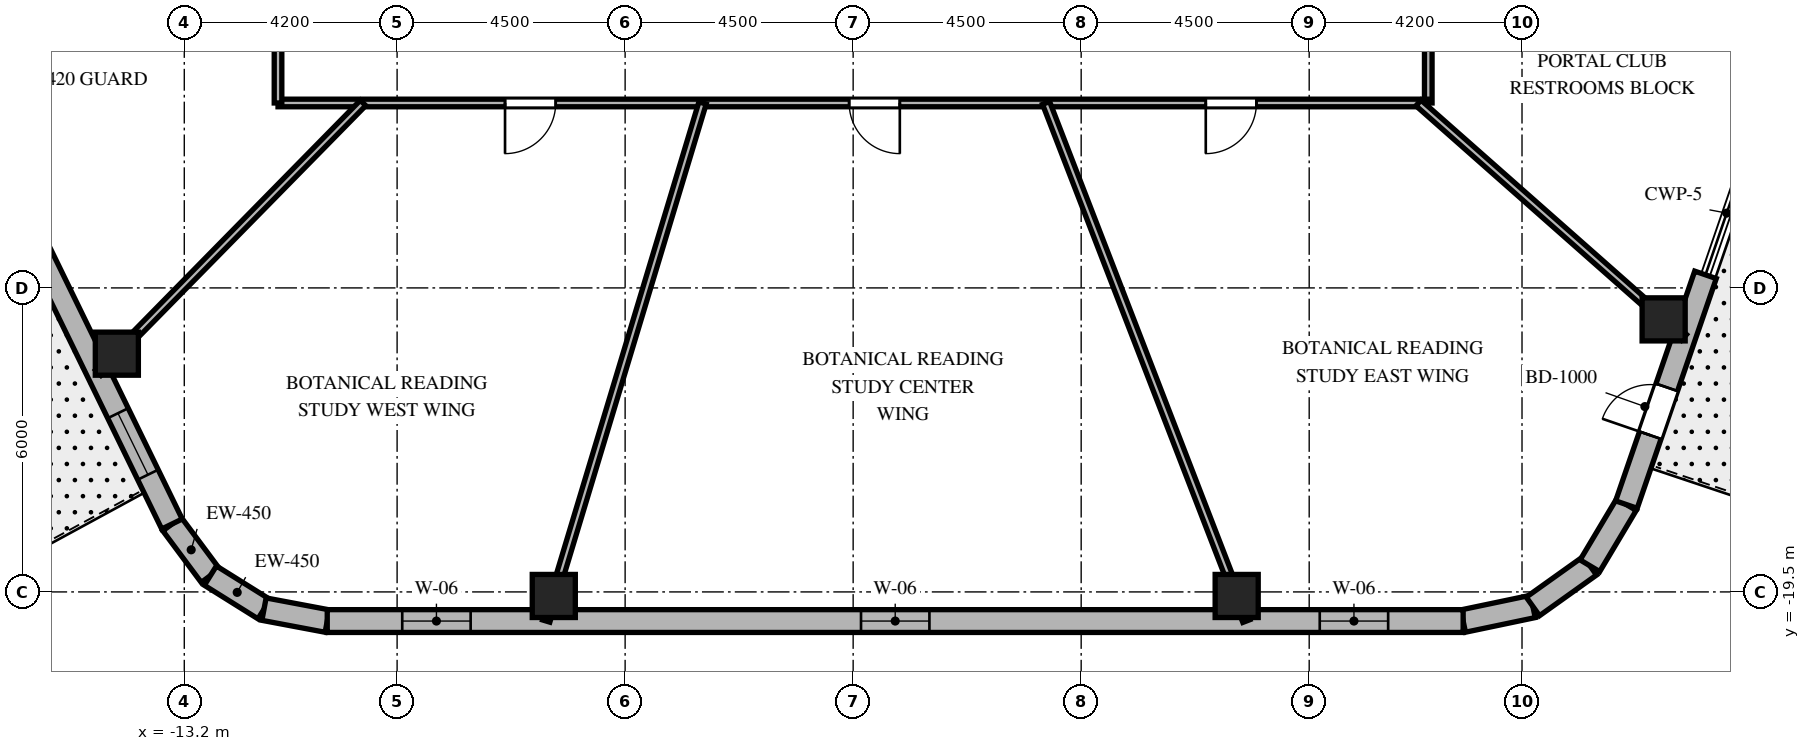
"""IFC4 building model, lengths in metres.
Left out: names, types, materials, properties, quantities, classifications, styles, units other than length and angle.
Written with IfcOpenShell. Run it as: python <this file> out.ifc"""

import sys

from ifc_helpers import new_model, si_unit, direction, frame, frame_2d, origin, origin_2d, place, context, subcontext, project, spatial, rectangle, extrude, element, fill, save


model = new_model("IFC4")
c1 = context("Model", 3, precision=1e-05, world=origin(), true_north=direction((0.0, 1.0)))
c2 = subcontext(c1, "Body", "Model", "MODEL_VIEW")
j1 = project(units=[si_unit("LENGTHUNIT", "METRE"), si_unit("PLANEANGLEUNIT", "RADIAN")], contexts=[c1])
p1 = place(None, origin())
s1 = spatial("IfcSite", under=j1, at=p1, CompositionType="ELEMENT")
p2 = place(p1, origin())
s2 = spatial("IfcBuilding", under=s1, at=p2, CompositionType="ELEMENT")
p3 = place(p2, frame((0.0, 0.0, 293.1)))
s3 = spatial("IfcBuildingStorey", under=s2, at=p3, CompositionType="ELEMENT", Elevation=293.1)
for number, where, z_axis, x_axis in (
    (1, (-5.908, -19.58, 0.0), (0.0, 0.0, 1.0), (1.0, 0.0, 0.0)),
    (2, (7.569, -19.58, 0.0), (0.0, 0.0, 1.0), (1.0, 0.0, 0.0)),
    (3, (15.995, -14.121, 0.0), (0.0, 0.0, 1.0), (1.0, 0.0, 0.0)),
    (4, (-14.531, -14.798, 0.0), (0.0, 0.0, 1.0), (1.0, 0.0, 0.0)),
):
    element("IfcColumn", number, at=place(p3, frame(where, z_axis=z_axis, x_axis=x_axis)), inside=s3, PredefinedType="COLUMN", context=c2, shape_type="SweptSolid", body=[
        extrude(rectangle(XDim=0.85, YDim=0.85, at=origin_2d()), origin(), (0.0, 0.0, 1.0), 4.5),
    ])
p4 = place(p3, frame((-13.443, -18.16, 0.0), z_axis=(0.0, 0.0, 1.0), x_axis=(0.597042425808, -0.802209661987, 0.0)))
e5 = element("IfcWall", 5, at=p4, inside=s3, PredefinedType="SOLIDWALL", context=c2, shape_type="SweptSolid", body=[
    extrude(rectangle(XDim=1.27, YDim=0.45, at=frame_2d((0.635, 0.0))), origin(), (0.0, 0.0, 1.0), 4.18),
])
p5 = place(p3, frame((-12.685, -19.178, 0.0), z_axis=(0.0, 0.0, 1.0), x_axis=(0.848031272749, -0.529946186362, 0.0)))
e6 = element("IfcWall", 6, at=p5, inside=s3, PredefinedType="SOLIDWALL", context=c2, shape_type="SweptSolid", body=[
    extrude(rectangle(XDim=1.248, YDim=0.45, at=frame_2d((0.624, 0.0))), origin(), (0.0, 0.0, 1.0), 4.18),
])
p6 = place(p3, frame((-11.626, -19.84, 0.0), z_axis=(0.0, 0.0, 1.0), x_axis=(0.982701956681, -0.185194126083, 0.0)))
e7 = element("IfcWall", 7, at=p6, inside=s3, PredefinedType="SOLIDWALL", context=c2, shape_type="SweptSolid", body=[
    extrude(rectangle(XDim=1.27, YDim=0.45, at=frame_2d((0.635, 0.0))), origin(), (0.0, 0.0, 1.0), 4.18),
])
p7 = place(p3, frame((12.038, -20.075, 0.0), z_axis=(0.0, 0.0, 1.0), x_axis=(0.978750122553, 0.205056571711, 0.0)))
e8 = element("IfcWall", 8, at=p7, inside=s3, PredefinedType="SOLIDWALL", context=c2, shape_type="SweptSolid", body=[
    extrude(rectangle(XDim=1.406, YDim=0.45, at=frame_2d((0.703, 0.0))), origin(), (0.0, 0.0, 1.0), 4.18),
])
p8 = place(p3, frame((13.415, -19.787, 0.0), z_axis=(0.0, 0.0, 1.0), x_axis=(0.814055493997, 0.580787097561, 0.0)))
e9 = element("IfcWall", 9, at=p8, inside=s3, PredefinedType="SOLIDWALL", context=c2, shape_type="SweptSolid", body=[
    extrude(rectangle(XDim=1.383, YDim=0.45, at=frame_2d((0.691, 0.0))), origin(), (0.0, 0.0, 1.0), 4.18),
])
p9 = place(p3, frame((14.54, -18.984, 0.0), z_axis=(0.0, 0.0, 1.0), x_axis=(0.512374906623, 0.858761873317, 0.0)))
e10 = element("IfcWall", 10, at=p9, inside=s3, PredefinedType="SOLIDWALL", context=c2, shape_type="SweptSolid", body=[
    extrude(rectangle(XDim=1.406, YDim=0.45, at=frame_2d((0.703, 0.0))), origin(), (0.0, 0.0, 1.0), 4.18),
])
p10 = place(p3, frame((-10.379, -20.075, 0.0), z_axis=(0.0, 0.0, 1.0), x_axis=(1.0, 0.0, 0.0)))
e11 = element("IfcWall", 11, at=p10, inside=s3, PredefinedType="SOLIDWALL", context=c2, shape_type="SweptSolid", body=[
    extrude(rectangle(XDim=22.417, YDim=0.45, at=frame_2d((11.208, 0.0))), origin(), (0.0, 0.0, 1.0), 4.18),
])
p11 = place(p10, frame((1.48, 0.0, 0.8)))
e12 = element("IfcOpeningElement", 12, at=p11, cuts=e11, PredefinedType="OPENING", context=c2, shape_type="SweptSolid", body=[
    extrude(rectangle(XDim=1.35, YDim=1.75, at=frame_2d((0.675, 0.875))), frame((0.0, 0.235, 0.0), z_axis=(0.0, -1.0, 0.0), x_axis=(1.0, 0.0, 0.0)), (0.0, 0.0, 1.0), 0.47),
])
p12 = place(p10, frame((10.534, 0.0, 0.8)))
e13 = element("IfcOpeningElement", 13, at=p12, cuts=e11, PredefinedType="OPENING", context=c2, shape_type="SweptSolid", body=[
    extrude(rectangle(XDim=1.35, YDim=1.75, at=frame_2d((0.675, 0.875))), frame((0.0, 0.235, 0.0), z_axis=(0.0, -1.0, 0.0), x_axis=(1.0, 0.0, 0.0)), (0.0, 0.0, 1.0), 0.47),
])
p13 = place(p10, frame((19.587, 0.0, 0.8)))
e14 = element("IfcOpeningElement", 14, at=p13, cuts=e11, PredefinedType="OPENING", context=c2, shape_type="SweptSolid", body=[
    extrude(rectangle(XDim=1.35, YDim=1.75, at=frame_2d((0.675, 0.875))), frame((0.0, 0.235, 0.0), z_axis=(0.0, -1.0, 0.0), x_axis=(1.0, 0.0, 0.0)), (0.0, 0.0, 1.0), 0.47),
])
p14 = place(p3, frame((15.26, -17.776, 0.0), z_axis=(0.0, 0.0, 1.0), x_axis=(0.325408461582, 0.945573547182, 0.0)))
e15 = element("IfcWall", 15, at=p14, inside=s3, PredefinedType="SOLIDWALL", context=c2, shape_type="SweptSolid", body=[
    extrude(rectangle(XDim=4.795, YDim=0.45, at=frame_2d((2.397, 0.0))), origin(), (0.0, 0.0, 1.0), 4.18),
])
p15 = place(p14, frame((1.447, 0.0, 0.0)))
e16 = element("IfcOpeningElement", 16, at=p15, cuts=e15, PredefinedType="OPENING", context=c2, shape_type="SweptSolid", body=[
    extrude(rectangle(XDim=1.0, YDim=2.15, at=frame_2d((0.5, 1.075))), frame((0.0, 0.235, 0.0), z_axis=(0.0, -1.0, 0.0), x_axis=(1.0, 0.0, 0.0)), (0.0, 0.0, 1.0), 0.47),
])
p16 = place(p3, frame((-21.138, -2.371, 0.0), z_axis=(0.0, 0.0, 1.0), x_axis=(0.438128124058, -0.89891253574, 0.0)))
e17 = element("IfcWall", 17, at=p16, inside=s3, PredefinedType="SOLIDWALL", context=c2, shape_type="SweptSolid", body=[
    extrude(rectangle(XDim=17.565, YDim=0.45, at=frame_2d((8.782, 0.0))), origin(), (0.0, 0.0, 1.0), 4.18),
])
p17 = place(p16, frame((4.769, 0.0, 0.0)))
e18 = element("IfcOpeningElement", 18, at=p17, cuts=e17, PredefinedType="OPENING", context=c2, shape_type="SweptSolid", body=[
    extrude(rectangle(XDim=0.95, YDim=2.15, at=frame_2d((0.475, 1.075))), frame((0.0, 0.235, 0.0), z_axis=(0.0, -1.0, 0.0), x_axis=(1.0, 0.0, 0.0)), (0.0, 0.0, 1.0), 0.47),
])
p18 = place(p16, frame((1.133, 0.0, 0.8)))
e19 = element("IfcOpeningElement", 19, at=p18, cuts=e17, PredefinedType="OPENING", context=c2, shape_type="SweptSolid", body=[
    extrude(rectangle(XDim=1.35, YDim=1.75, at=frame_2d((0.675, 0.875))), frame((0.0, 0.235, 0.0), z_axis=(0.0, -1.0, 0.0), x_axis=(1.0, 0.0, 0.0)), (0.0, 0.0, 1.0), 0.47),
])
p19 = place(p16, frame((8.158, 0.0, 0.8)))
e20 = element("IfcOpeningElement", 20, at=p19, cuts=e17, PredefinedType="OPENING", context=c2, shape_type="SweptSolid", body=[
    extrude(rectangle(XDim=1.35, YDim=1.75, at=frame_2d((0.675, 0.875))), frame((0.0, 0.235, 0.0), z_axis=(0.0, -1.0, 0.0), x_axis=(1.0, 0.0, 0.0)), (0.0, 0.0, 1.0), 0.47),
])
p20 = place(p16, frame((15.132, 0.0, 0.8)))
e21 = element("IfcOpeningElement", 21, at=p20, cuts=e17, PredefinedType="OPENING", context=c2, shape_type="SweptSolid", body=[
    extrude(rectangle(XDim=1.35, YDim=1.75, at=frame_2d((0.675, 0.875))), frame((0.0, 0.235, 0.0), z_axis=(0.0, -1.0, 0.0), x_axis=(1.0, 0.0, 0.0)), (0.0, 0.0, 1.0), 0.47),
])
p21 = place(p3, frame((11.35, 9.85, 0.0), z_axis=(0.0, 0.0, 1.0), x_axis=(0.0, -1.0, 0.0)))
e22 = element("IfcWall", 22, at=p21, inside=s3, PredefinedType="PARTITIONING", context=c2, shape_type="SweptSolid", body=[
    extrude(rectangle(XDim=19.7, YDim=0.15, at=frame_2d((9.85, 0.0))), origin(), (0.0, 0.0, 1.0), 3.67),
])
p22 = place(p21, frame((2.973, 0.0, 0.0)))
e23 = element("IfcOpeningElement", 23, at=p22, cuts=e22, PredefinedType="OPENING", context=c2, shape_type="SweptSolid", body=[
    extrude(rectangle(XDim=1.0, YDim=2.03, at=frame_2d((0.5, 1.015))), frame((0.0, 0.085, 0.0), z_axis=(0.0, -1.0, 0.0), x_axis=(1.0, 0.0, 0.0)), (0.0, 0.0, 1.0), 0.17),
])
p23 = place(p21, frame((15.189, 0.0, 0.0)))
e24 = element("IfcOpeningElement", 24, at=p23, cuts=e22, PredefinedType="OPENING", context=c2, shape_type="SweptSolid", body=[
    extrude(rectangle(XDim=1.0, YDim=2.03, at=frame_2d((0.5, 1.015))), frame((0.0, 0.085, 0.0), z_axis=(0.0, -1.0, 0.0), x_axis=(1.0, 0.0, 0.0)), (0.0, 0.0, 1.0), 0.17),
])
p24 = place(p21, frame((8.81, 0.0, 0.0)))
e25 = element("IfcOpeningElement", 25, at=p24, cuts=e22, PredefinedType="OPENING", context=c2, shape_type="SweptSolid", body=[
    extrude(rectangle(XDim=1.0, YDim=2.03, at=frame_2d((0.5, 1.015))), frame((0.0, 0.085, 0.0), z_axis=(0.0, -1.0, 0.0), x_axis=(1.0, 0.0, 0.0)), (0.0, 0.0, 1.0), 0.17),
])
p25 = place(p3, frame((11.35, -9.85, 0.0), z_axis=(0.0, 0.0, 1.0), x_axis=(-1.0, 0.0, 0.0)))
e26 = element("IfcWall", 26, at=p25, inside=s3, PredefinedType="PARTITIONING", context=c2, shape_type="SweptSolid", body=[
    extrude(rectangle(XDim=22.7, YDim=0.15, at=frame_2d((11.35, 0.0))), origin(), (0.0, 0.0, 1.0), 3.67),
])
p26 = place(p25, frame((17.22, 0.0, 0.0)))
e27 = element("IfcOpeningElement", 27, at=p26, cuts=e26, PredefinedType="OPENING", context=c2, shape_type="SweptSolid", body=[
    extrude(rectangle(XDim=1.0, YDim=2.03, at=frame_2d((0.5, 1.015))), frame((0.0, 0.085, 0.0), z_axis=(0.0, -1.0, 0.0), x_axis=(1.0, 0.0, 0.0)), (0.0, 0.0, 1.0), 0.17),
])
p27 = place(p25, frame((10.429, 0.0, 0.0)))
e28 = element("IfcOpeningElement", 28, at=p27, cuts=e26, PredefinedType="OPENING", context=c2, shape_type="SweptSolid", body=[
    extrude(rectangle(XDim=1.0, YDim=2.03, at=frame_2d((0.5, 1.015))), frame((0.0, 0.085, 0.0), z_axis=(0.0, -1.0, 0.0), x_axis=(1.0, 0.0, 0.0)), (0.0, 0.0, 1.0), 0.17),
])
p28 = place(p25, frame((3.391, 0.0, 0.0)))
e29 = element("IfcOpeningElement", 29, at=p28, cuts=e26, PredefinedType="OPENING", context=c2, shape_type="SweptSolid", body=[
    extrude(rectangle(XDim=1.0, YDim=2.03, at=frame_2d((0.5, 1.015))), frame((0.0, 0.085, 0.0), z_axis=(0.0, -1.0, 0.0), x_axis=(1.0, 0.0, 0.0)), (0.0, 0.0, 1.0), 0.17),
])
p29 = place(p3, frame((-11.35, -9.85, 0.0), z_axis=(0.0, 0.0, 1.0), x_axis=(0.0, 1.0, 0.0)))
e30 = element("IfcWall", 30, at=p29, inside=s3, PredefinedType="PARTITIONING", context=c2, shape_type="SweptSolid", body=[
    extrude(rectangle(XDim=19.7, YDim=0.15, at=frame_2d((9.85, 0.0))), origin(), (0.0, 0.0, 1.0), 3.67),
])
p30 = place(p29, frame((15.189, 0.0, 0.0)))
e31 = element("IfcOpeningElement", 31, at=p30, cuts=e30, PredefinedType="OPENING", context=c2, shape_type="SweptSolid", body=[
    extrude(rectangle(XDim=1.0, YDim=2.03, at=frame_2d((0.5, 1.015))), frame((0.0, 0.085, 0.0), z_axis=(0.0, -1.0, 0.0), x_axis=(1.0, 0.0, 0.0)), (0.0, 0.0, 1.0), 0.17),
])
p31 = place(p29, frame((8.81, 0.0, 0.0)))
e32 = element("IfcOpeningElement", 32, at=p31, cuts=e30, PredefinedType="OPENING", context=c2, shape_type="SweptSolid", body=[
    extrude(rectangle(XDim=1.0, YDim=2.03, at=frame_2d((0.5, 1.015))), frame((0.0, 0.085, 0.0), z_axis=(0.0, -1.0, 0.0), x_axis=(1.0, 0.0, 0.0)), (0.0, 0.0, 1.0), 0.17),
])
p32 = place(p29, frame((2.973, 0.0, 0.0)))
e33 = element("IfcOpeningElement", 33, at=p32, cuts=e30, PredefinedType="OPENING", context=c2, shape_type="SweptSolid", body=[
    extrude(rectangle(XDim=1.0, YDim=2.03, at=frame_2d((0.5, 1.015))), frame((0.0, 0.085, 0.0), z_axis=(0.0, -1.0, 0.0), x_axis=(1.0, 0.0, 0.0)), (0.0, 0.0, 1.0), 0.17),
])
p33 = place(p3, frame((-9.672, -9.85, 0.0), z_axis=(0.0, 0.0, 1.0), x_axis=(-0.700629771301, -0.713524998558, 0.0)))
e34 = element("IfcWall", 34, at=p33, inside=s3, PredefinedType="PARTITIONING", context=c2, shape_type="SweptSolid", body=[
    extrude(rectangle(XDim=7.459, YDim=0.15, at=frame_2d((3.73, 0.0))), origin(), (0.0, 0.0, 1.0), 3.52),
])
p34 = place(p3, frame((-2.972, -9.85, 0.0), z_axis=(0.0, 0.0, 1.0), x_axis=(-0.288872169679, -0.957367677324, 0.0)))
e35 = element("IfcWall", 35, at=p34, inside=s3, PredefinedType="PARTITIONING", context=c2, shape_type="SweptSolid", body=[
    extrude(rectangle(XDim=10.68, YDim=0.15, at=frame_2d((5.34, 0.0))), origin(), (0.0, 0.0, 1.0), 3.52),
])
p35 = place(p3, frame((3.808, -9.85, 0.0), z_axis=(0.0, 0.0, 1.0), x_axis=(0.360587327934, -0.932725457427, 0.0)))
e36 = element("IfcWall", 36, at=p35, inside=s3, PredefinedType="PARTITIONING", context=c2, shape_type="SweptSolid", body=[
    extrude(rectangle(XDim=10.962, YDim=0.15, at=frame_2d((5.481, 0.0))), origin(), (0.0, 0.0, 1.0), 3.52),
])
p36 = place(p3, frame((11.157, -9.85, 0.0), z_axis=(0.0, 0.0, 1.0), x_axis=(0.74966962095, -0.661812253909, 0.0)))
e37 = element("IfcWall", 37, at=p36, inside=s3, PredefinedType="PARTITIONING", context=c2, shape_type="SweptSolid", body=[
    extrude(rectangle(XDim=6.989, YDim=0.15, at=frame_2d((3.494, 0.0))), origin(), (0.0, 0.0, 1.0), 3.52),
])
p37 = place(p11, origin())
e38 = element("IfcWindow", 38, at=p37, inside=s3, PartitioningType="SINGLE_PANEL", PredefinedType="WINDOW", context=c2, shape_type="SweptSolid", body=[
    extrude(rectangle(XDim=1.35, YDim=1.75, at=frame_2d((0.675, 0.875))), frame((0.0, 0.03, 0.0), z_axis=(0.0, -1.0, 0.0), x_axis=(1.0, 0.0, 0.0)), (0.0, 0.0, 1.0), 0.06),
])
fill(e12, e38)
p38 = place(p12, origin())
e39 = element("IfcWindow", 39, at=p38, inside=s3, PartitioningType="SINGLE_PANEL", PredefinedType="WINDOW", context=c2, shape_type="SweptSolid", body=[
    extrude(rectangle(XDim=1.35, YDim=1.75, at=frame_2d((0.675, 0.875))), frame((0.0, 0.03, 0.0), z_axis=(0.0, -1.0, 0.0), x_axis=(1.0, 0.0, 0.0)), (0.0, 0.0, 1.0), 0.06),
])
fill(e13, e39)
p39 = place(p13, origin())
e40 = element("IfcWindow", 40, at=p39, inside=s3, PartitioningType="SINGLE_PANEL", PredefinedType="WINDOW", context=c2, shape_type="SweptSolid", body=[
    extrude(rectangle(XDim=1.35, YDim=1.75, at=frame_2d((0.675, 0.875))), frame((0.0, 0.03, 0.0), z_axis=(0.0, -1.0, 0.0), x_axis=(1.0, 0.0, 0.0)), (0.0, 0.0, 1.0), 0.06),
])
fill(e14, e40)
p40 = place(p15, origin())
e41 = element("IfcDoor", 41, at=p40, inside=s3, OperationType="SINGLE_SWING_LEFT", PredefinedType="DOOR", context=c2, shape_type="SweptSolid", body=[
    extrude(rectangle(XDim=1.0, YDim=2.15, at=frame_2d((0.5, 1.075))), frame((0.0, 0.025, 0.0), z_axis=(0.0, -1.0, 0.0), x_axis=(1.0, 0.0, 0.0)), (0.0, 0.0, 1.0), 0.05),
])
fill(e16, e41)
p41 = place(p20, origin())
e42 = element("IfcWindow", 42, at=p41, inside=s3, PartitioningType="SINGLE_PANEL", PredefinedType="WINDOW", context=c2, shape_type="SweptSolid", body=[
    extrude(rectangle(XDim=1.35, YDim=1.75, at=frame_2d((0.675, 0.875))), frame((0.0, 0.03, 0.0), z_axis=(0.0, -1.0, 0.0), x_axis=(1.0, 0.0, 0.0)), (0.0, 0.0, 1.0), 0.06),
])
fill(e21, e42)
p42 = place(p26, origin())
e43 = element("IfcDoor", 43, at=p42, inside=s3, OperationType="SINGLE_SWING_RIGHT", PredefinedType="DOOR", context=c2, shape_type="SweptSolid", body=[
    extrude(rectangle(XDim=1.0, YDim=2.03, at=frame_2d((0.5, 1.015))), frame((0.0, 0.025, 0.0), z_axis=(0.0, -1.0, 0.0), x_axis=(1.0, 0.0, 0.0)), (0.0, 0.0, 1.0), 0.05),
])
fill(e27, e43)
p43 = place(p27, origin())
e44 = element("IfcDoor", 44, at=p43, inside=s3, OperationType="SINGLE_SWING_LEFT", PredefinedType="DOOR", context=c2, shape_type="SweptSolid", body=[
    extrude(rectangle(XDim=1.0, YDim=2.03, at=frame_2d((0.5, 1.015))), frame((0.0, 0.025, 0.0), z_axis=(0.0, -1.0, 0.0), x_axis=(1.0, 0.0, 0.0)), (0.0, 0.0, 1.0), 0.05),
])
fill(e28, e44)
p44 = place(p28, origin())
e45 = element("IfcDoor", 45, at=p44, inside=s3, OperationType="SINGLE_SWING_RIGHT", PredefinedType="DOOR", context=c2, shape_type="SweptSolid", body=[
    extrude(rectangle(XDim=1.0, YDim=2.03, at=frame_2d((0.5, 1.015))), frame((0.0, 0.025, 0.0), z_axis=(0.0, -1.0, 0.0), x_axis=(1.0, 0.0, 0.0)), (0.0, 0.0, 1.0), 0.05),
])
fill(e29, e45)
save(model, sys.argv[1])
